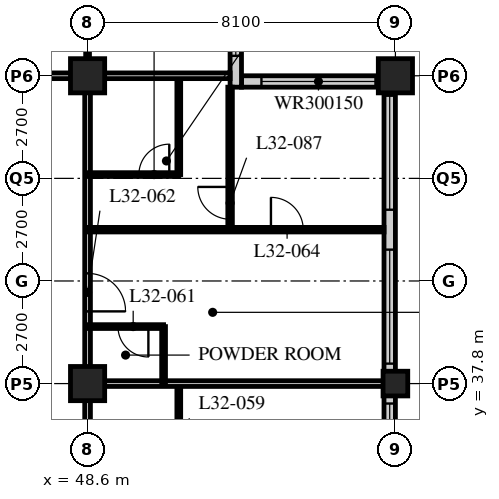
"""IFC4 building model, lengths in metres.
Left out: names, types, materials, properties, quantities, classifications, styles, units other than length and angle.
Written with IfcOpenShell. Run it as: python <this file> out.ifc"""

import sys

from ifc_helpers import new_model, si_unit, direction, frame, frame_2d, origin, origin_2d, place, context, subcontext, project, spatial, rectangle, hollow_rectangle, extrude, element, fill, save


model = new_model("IFC4")
c1 = context("Model", 3, precision=1e-05, world=origin(), true_north=direction((0.0, 1.0)))
c2 = subcontext(c1, "Body", "Model", "MODEL_VIEW")
j1 = project(units=[si_unit("LENGTHUNIT", "METRE"), si_unit("PLANEANGLEUNIT", "RADIAN")], contexts=[c1])
p1 = place(None, origin())
s1 = spatial("IfcSite", under=j1, at=p1, CompositionType="ELEMENT")
p2 = place(p1, origin())
s2 = spatial("IfcBuilding", under=s1, at=p2, CompositionType="ELEMENT")
p3 = place(p2, frame((0.0, 0.0, 127.2)))
s3 = spatial("IfcBuildingStorey", under=s2, at=p3, CompositionType="ELEMENT", Elevation=127.2)
for number, where, z_axis, x_axis in (
    (1, (48.6, 37.8, 0.0), (0.0, 0.0, 1.0), (1.0, 0.0, 0.0)),
    (2, (48.6, 45.9, 0.0), (0.0, 0.0, 1.0), (1.0, 0.0, 0.0)),
):
    element("IfcColumn", number, at=place(p3, frame(where, z_axis=z_axis, x_axis=x_axis)), inside=s3, PredefinedType="COLUMN", context=c2, shape_type="SweptSolid", body=[
        extrude(hollow_rectangle(XDim=0.9, YDim=0.9, WallThickness=0.09, at=origin_2d()), origin(), (0.0, 0.0, 1.0), 3.4),
    ])
p4 = place(p3, frame((56.7, 37.8, 0.0), z_axis=(0.0, 0.0, 1.0), x_axis=(1.0, 0.0, 0.0)))
e3 = element("IfcColumn", 3, at=p4, inside=s3, PredefinedType="COLUMN", context=c2, shape_type="SweptSolid", body=[
    extrude(hollow_rectangle(XDim=0.65, YDim=0.65, WallThickness=0.055, at=origin_2d()), origin(), (0.0, 0.0, 1.0), 3.4),
])
p5 = place(p3, frame((56.7, 45.9, 0.0), z_axis=(0.0, 0.0, 1.0), x_axis=(1.0, 0.0, 0.0)))
e4 = element("IfcColumn", 4, at=p5, inside=s3, PredefinedType="COLUMN", context=c2, shape_type="SweptSolid", body=[
    extrude(hollow_rectangle(XDim=0.9, YDim=0.9, WallThickness=0.09, at=origin_2d()), origin(), (0.0, 0.0, 1.0), 3.4),
])
p6 = place(p3, frame((56.55, 13.8, 0.0), z_axis=(0.0, 0.0, 1.0), x_axis=(0.0, 1.0, 0.0)))
e5 = element("IfcWall", 5, at=p6, inside=s3, PredefinedType="SOLIDWALL", context=c2, shape_type="SweptSolid", body=[
    extrude(rectangle(XDim=32.1, YDim=0.3, at=frame_2d((16.05, 0.0))), origin(), (0.0, 0.0, 1.0), 3.19),
])
p7 = place(p6, frame((0.225, 0.0, 0.9)))
e6 = element("IfcOpeningElement", 6, at=p7, cuts=e5, PredefinedType="OPENING", context=c2, shape_type="SweptSolid", body=[
    extrude(rectangle(XDim=3.0, YDim=2.0, at=frame_2d((1.5, 1.0))), frame((0.0, 0.16, 0.0), z_axis=(0.0, -1.0, 0.0), x_axis=(1.0, 0.0, 0.0)), (0.0, 0.0, 1.0), 0.32),
])
p8 = place(p6, frame((4.275, 0.0, 0.9)))
e7 = element("IfcOpeningElement", 7, at=p8, cuts=e5, PredefinedType="OPENING", context=c2, shape_type="SweptSolid", body=[
    extrude(rectangle(XDim=3.0, YDim=2.0, at=frame_2d((1.5, 1.0))), frame((0.0, 0.16, 0.0), z_axis=(0.0, -1.0, 0.0), x_axis=(1.0, 0.0, 0.0)), (0.0, 0.0, 1.0), 0.32),
])
p9 = place(p6, frame((8.325, 0.0, 0.9)))
e8 = element("IfcOpeningElement", 8, at=p9, cuts=e5, PredefinedType="OPENING", context=c2, shape_type="SweptSolid", body=[
    extrude(rectangle(XDim=3.0, YDim=2.0, at=frame_2d((1.5, 1.0))), frame((0.0, 0.16, 0.0), z_axis=(0.0, -1.0, 0.0), x_axis=(1.0, 0.0, 0.0)), (0.0, 0.0, 1.0), 0.32),
])
p10 = place(p6, frame((12.375, 0.0, 0.9)))
e9 = element("IfcOpeningElement", 9, at=p10, cuts=e5, PredefinedType="OPENING", context=c2, shape_type="SweptSolid", body=[
    extrude(rectangle(XDim=3.0, YDim=2.0, at=frame_2d((1.5, 1.0))), frame((0.0, 0.16, 0.0), z_axis=(0.0, -1.0, 0.0), x_axis=(1.0, 0.0, 0.0)), (0.0, 0.0, 1.0), 0.32),
])
p11 = place(p6, frame((16.425, 0.0, 0.9)))
e10 = element("IfcOpeningElement", 10, at=p11, cuts=e5, PredefinedType="OPENING", context=c2, shape_type="SweptSolid", body=[
    extrude(rectangle(XDim=3.0, YDim=2.0, at=frame_2d((1.5, 1.0))), frame((0.0, 0.16, 0.0), z_axis=(0.0, -1.0, 0.0), x_axis=(1.0, 0.0, 0.0)), (0.0, 0.0, 1.0), 0.32),
])
p12 = place(p6, frame((20.475, 0.0, 0.9)))
e11 = element("IfcOpeningElement", 11, at=p12, cuts=e5, PredefinedType="OPENING", context=c2, shape_type="SweptSolid", body=[
    extrude(rectangle(XDim=3.0, YDim=2.0, at=frame_2d((1.5, 1.0))), frame((0.0, 0.16, 0.0), z_axis=(0.0, -1.0, 0.0), x_axis=(1.0, 0.0, 0.0)), (0.0, 0.0, 1.0), 0.32),
])
p13 = place(p6, frame((24.525, 0.0, 0.9)))
e12 = element("IfcOpeningElement", 12, at=p13, cuts=e5, PredefinedType="OPENING", context=c2, shape_type="SweptSolid", body=[
    extrude(rectangle(XDim=3.0, YDim=2.0, at=frame_2d((1.5, 1.0))), frame((0.0, 0.16, 0.0), z_axis=(0.0, -1.0, 0.0), x_axis=(1.0, 0.0, 0.0)), (0.0, 0.0, 1.0), 0.32),
])
p14 = place(p6, frame((28.575, 0.0, 0.9)))
e13 = element("IfcOpeningElement", 13, at=p14, cuts=e5, PredefinedType="OPENING", context=c2, shape_type="SweptSolid", body=[
    extrude(rectangle(XDim=3.0, YDim=2.0, at=frame_2d((1.5, 1.0))), frame((0.0, 0.16, 0.0), z_axis=(0.0, -1.0, 0.0), x_axis=(1.0, 0.0, 0.0)), (0.0, 0.0, 1.0), 0.32),
])
p15 = place(p3, frame((56.4, 45.75, 0.0), z_axis=(0.0, 0.0, 1.0), x_axis=(-1.0, 0.0, 0.0)))
e14 = element("IfcWall", 14, at=p15, inside=s3, PredefinedType="SOLIDWALL", context=c2, shape_type="SweptSolid", body=[
    extrude(rectangle(XDim=3.75, YDim=0.3, at=frame_2d((1.875, 0.0))), origin(), (0.0, 0.0, 1.0), 3.19),
])
p16 = place(p15, frame((0.225, 0.0, 0.9)))
e15 = element("IfcOpeningElement", 15, at=p16, cuts=e14, PredefinedType="OPENING", context=c2, shape_type="SweptSolid", body=[
    extrude(rectangle(XDim=3.0, YDim=1.5, at=frame_2d((1.5, 0.75))), frame((0.0, 0.16, 0.0), z_axis=(0.0, -1.0, 0.0), x_axis=(1.0, 0.0, 0.0)), (0.0, 0.0, 1.0), 0.32),
])
p17 = place(p3, frame((52.5, 45.6, 0.0), z_axis=(0.0, 0.0, 1.0), x_axis=(0.0, 1.0, 0.0)))
e16 = element("IfcWall", 16, at=p17, inside=s3, PredefinedType="SOLIDWALL", context=c2, shape_type="SweptSolid", body=[
    extrude(rectangle(XDim=4.35, YDim=0.3, at=frame_2d((2.175, 0.0))), origin(), (0.0, 0.0, 1.0), 3.19),
])
p18 = place(p17, frame((0.825, 0.0, 0.9)))
e17 = element("IfcOpeningElement", 17, at=p18, cuts=e16, PredefinedType="OPENING", context=c2, shape_type="SweptSolid", body=[
    extrude(rectangle(XDim=3.0, YDim=1.5, at=frame_2d((1.5, 0.75))), frame((0.0, 0.16, 0.0), z_axis=(0.0, -1.0, 0.0), x_axis=(1.0, 0.0, 0.0)), (0.0, 0.0, 1.0), 0.32),
])
p19 = place(p3, frame((8.1, 45.9, 0.0), z_axis=(0.0, 0.0, 1.0), x_axis=(1.0, 0.0, 0.0)))
e18 = element("IfcWall", 18, at=p19, inside=s3, PredefinedType="PARTITIONING", context=c2, shape_type="SweptSolid", body=[
    extrude(rectangle(XDim=40.5, YDim=0.15, at=frame_2d((20.25, 0.0))), origin(), (0.0, 0.0, 1.0), 2.578),
])
p20 = place(p19, frame((9.625, 0.0, 0.0)))
e19 = element("IfcOpeningElement", 19, at=p20, cuts=e18, PredefinedType="OPENING", context=c2, shape_type="SweptSolid", body=[
    extrude(rectangle(XDim=1.0, YDim=2.1, at=frame_2d((0.5, 1.05))), frame((0.0, 0.085, 0.0), z_axis=(0.0, -1.0, 0.0), x_axis=(1.0, 0.0, 0.0)), (0.0, 0.0, 1.0), 0.17),
])
p21 = place(p19, frame((21.65, 0.0, 0.0)))
e20 = element("IfcOpeningElement", 20, at=p21, cuts=e18, PredefinedType="OPENING", context=c2, shape_type="SweptSolid", body=[
    extrude(rectangle(XDim=1.0, YDim=2.1, at=frame_2d((0.5, 1.05))), frame((0.0, 0.085, 0.0), z_axis=(0.0, -1.0, 0.0), x_axis=(1.0, 0.0, 0.0)), (0.0, 0.0, 1.0), 0.17),
])
p22 = place(p19, frame((26.75, 0.0, 0.0)))
e21 = element("IfcOpeningElement", 21, at=p22, cuts=e18, PredefinedType="OPENING", context=c2, shape_type="SweptSolid", body=[
    extrude(rectangle(XDim=1.0, YDim=2.1, at=frame_2d((0.5, 1.05))), frame((0.0, 0.085, 0.0), z_axis=(0.0, -1.0, 0.0), x_axis=(1.0, 0.0, 0.0)), (0.0, 0.0, 1.0), 0.17),
])
p23 = place(p19, frame((28.95, 0.0, 0.0)))
e22 = element("IfcOpeningElement", 22, at=p23, cuts=e18, PredefinedType="OPENING", context=c2, shape_type="SweptSolid", body=[
    extrude(rectangle(XDim=1.0, YDim=2.1, at=frame_2d((0.5, 1.05))), frame((0.0, 0.085, 0.0), z_axis=(0.0, -1.0, 0.0), x_axis=(1.0, 0.0, 0.0)), (0.0, 0.0, 1.0), 0.17),
])
p24 = place(p19, frame((34.85, 0.0, 0.0)))
e23 = element("IfcOpeningElement", 23, at=p24, cuts=e18, PredefinedType="OPENING", context=c2, shape_type="SweptSolid", body=[
    extrude(rectangle(XDim=1.0, YDim=2.1, at=frame_2d((0.5, 1.05))), frame((0.0, 0.085, 0.0), z_axis=(0.0, -1.0, 0.0), x_axis=(1.0, 0.0, 0.0)), (0.0, 0.0, 1.0), 0.17),
])
p25 = place(p19, frame((36.875, 0.0, 0.0)))
e24 = element("IfcOpeningElement", 24, at=p25, cuts=e18, PredefinedType="OPENING", context=c2, shape_type="SweptSolid", body=[
    extrude(rectangle(XDim=1.0, YDim=2.1, at=frame_2d((0.5, 1.05))), frame((0.0, 0.085, 0.0), z_axis=(0.0, -1.0, 0.0), x_axis=(1.0, 0.0, 0.0)), (0.0, 0.0, 1.0), 0.17),
])
p26 = place(p19, frame((2.625, 0.0, 0.0)))
e25 = element("IfcOpeningElement", 25, at=p26, cuts=e18, PredefinedType="OPENING", context=c2, shape_type="SweptSolid", body=[
    extrude(rectangle(XDim=1.0, YDim=2.1, at=frame_2d((0.5, 1.05))), frame((0.0, 0.085, 0.0), z_axis=(0.0, -1.0, 0.0), x_axis=(1.0, 0.0, 0.0)), (0.0, 0.0, 1.0), 0.17),
])
p27 = place(p3, frame((48.6, 21.6, 0.0), z_axis=(0.0, 0.0, 1.0), x_axis=(0.0, 1.0, 0.0)))
e26 = element("IfcWall", 26, at=p27, inside=s3, PredefinedType="PARTITIONING", context=c2, shape_type="SweptSolid", body=[
    extrude(rectangle(XDim=24.3, YDim=0.15, at=frame_2d((12.15, 0.0))), origin(), (0.0, 0.0, 1.0), 2.578),
])
p28 = place(p27, frame((2.75, 0.0, 0.0)))
e27 = element("IfcOpeningElement", 27, at=p28, cuts=e26, PredefinedType="OPENING", context=c2, shape_type="SweptSolid", body=[
    extrude(rectangle(XDim=1.0, YDim=2.1, at=frame_2d((0.5, 1.05))), frame((0.0, 0.085, 0.0), z_axis=(0.0, -1.0, 0.0), x_axis=(1.0, 0.0, 0.0)), (0.0, 0.0, 1.0), 0.17),
])
p29 = place(p27, frame((4.65, 0.0, 0.0)))
e28 = element("IfcOpeningElement", 28, at=p29, cuts=e26, PredefinedType="OPENING", context=c2, shape_type="SweptSolid", body=[
    extrude(rectangle(XDim=1.0, YDim=2.1, at=frame_2d((0.5, 1.05))), frame((0.0, 0.085, 0.0), z_axis=(0.0, -1.0, 0.0), x_axis=(1.0, 0.0, 0.0)), (0.0, 0.0, 1.0), 0.17),
])
p30 = place(p27, frame((10.0, 0.0, 0.0)))
e29 = element("IfcOpeningElement", 29, at=p30, cuts=e26, PredefinedType="OPENING", context=c2, shape_type="SweptSolid", body=[
    extrude(rectangle(XDim=1.0, YDim=2.1, at=frame_2d((0.5, 1.05))), frame((0.0, 0.085, 0.0), z_axis=(0.0, -1.0, 0.0), x_axis=(1.0, 0.0, 0.0)), (0.0, 0.0, 1.0), 0.17),
])
p31 = place(p27, frame((18.1, 0.0, 0.0)))
e30 = element("IfcOpeningElement", 30, at=p31, cuts=e26, PredefinedType="OPENING", context=c2, shape_type="SweptSolid", body=[
    extrude(rectangle(XDim=1.0, YDim=2.1, at=frame_2d((0.5, 1.05))), frame((0.0, 0.085, 0.0), z_axis=(0.0, -1.0, 0.0), x_axis=(1.0, 0.0, 0.0)), (0.0, 0.0, 1.0), 0.17),
])
p32 = place(p3, frame((51.0, 35.2, 0.0), z_axis=(0.0, 0.0, 1.0), x_axis=(0.0, 1.0, 0.0)))
e31 = element("IfcWall", 31, at=p32, inside=s3, PredefinedType="PARTITIONING", context=c2, shape_type="SweptSolid", body=[
    extrude(rectangle(XDim=2.6, YDim=0.1, at=frame_2d((1.3, 0.0))), origin(), (0.0, 0.0, 1.0), 3.19),
])
p33 = place(p3, frame((48.6, 37.8, 0.0), z_axis=(0.0, 0.0, 1.0), x_axis=(1.0, 0.0, 0.0)))
e32 = element("IfcWall", 32, at=p33, inside=s3, PredefinedType="PARTITIONING", context=c2, shape_type="SweptSolid", body=[
    extrude(rectangle(XDim=7.8, YDim=0.15, at=frame_2d((3.9, 0.0))), origin(), (0.0, 0.0, 1.0), 2.578),
])
p34 = place(p3, frame((50.6, 37.8, 0.0), z_axis=(0.0, 0.0, 1.0), x_axis=(0.0, 1.0, 0.0)))
e33 = element("IfcWall", 33, at=p34, inside=s3, PredefinedType="PARTITIONING", context=c2, shape_type="SweptSolid", body=[
    extrude(rectangle(XDim=1.5, YDim=0.1, at=frame_2d((0.75, 0.0))), origin(), (0.0, 0.0, 1.0), 3.19),
])
p35 = place(p3, frame((48.6, 39.3, 0.0), z_axis=(0.0, 0.0, 1.0), x_axis=(1.0, 0.0, 0.0)))
e34 = element("IfcWall", 34, at=p35, inside=s3, PredefinedType="PARTITIONING", context=c2, shape_type="SweptSolid", body=[
    extrude(rectangle(XDim=2.0, YDim=0.1, at=frame_2d((1.0, 0.0))), origin(), (0.0, 0.0, 1.0), 3.19),
])
p36 = place(p35, frame((0.8, 0.0, 0.0)))
e35 = element("IfcOpeningElement", 35, at=p36, cuts=e34, PredefinedType="OPENING", context=c2, shape_type="SweptSolid", body=[
    extrude(rectangle(XDim=0.8, YDim=2.1, at=frame_2d((0.4, 1.05))), frame((0.0, 0.06, 0.0), z_axis=(0.0, -1.0, 0.0), x_axis=(1.0, 0.0, 0.0)), (0.0, 0.0, 1.0), 0.12),
])
p37 = place(p3, frame((51.0, 43.3, 0.0), z_axis=(0.0, 0.0, 1.0), x_axis=(0.0, 1.0, 0.0)))
e36 = element("IfcWall", 36, at=p37, inside=s3, PredefinedType="PARTITIONING", context=c2, shape_type="SweptSolid", body=[
    extrude(rectangle(XDim=2.6, YDim=0.1, at=frame_2d((1.3, 0.0))), origin(), (0.0, 0.0, 1.0), 3.19),
])
p38 = place(p3, frame((48.6, 43.3, 0.0), z_axis=(0.0, 0.0, 1.0), x_axis=(1.0, 0.0, 0.0)))
e37 = element("IfcWall", 37, at=p38, inside=s3, PredefinedType="PARTITIONING", context=c2, shape_type="SweptSolid", body=[
    extrude(rectangle(XDim=2.4, YDim=0.1, at=frame_2d((1.2, 0.0))), origin(), (0.0, 0.0, 1.0), 3.19),
])
p39 = place(p38, frame((1.35, 0.0, 0.0)))
e38 = element("IfcOpeningElement", 38, at=p39, cuts=e37, PredefinedType="OPENING", context=c2, shape_type="SweptSolid", body=[
    extrude(rectangle(XDim=0.8, YDim=2.1, at=frame_2d((0.4, 1.05))), frame((0.0, 0.06, 0.0), z_axis=(0.0, -1.0, 0.0), x_axis=(1.0, 0.0, 0.0)), (0.0, 0.0, 1.0), 0.12),
])
p40 = place(p3, frame((48.6, 41.85, 0.0), z_axis=(0.0, 0.0, 1.0), x_axis=(1.0, 0.0, 0.0)))
e39 = element("IfcWall", 39, at=p40, inside=s3, PredefinedType="PARTITIONING", context=c2, shape_type="SweptSolid", body=[
    extrude(rectangle(XDim=7.8, YDim=0.12, at=frame_2d((3.9, 0.0))), origin(), (0.0, 0.0, 1.0), 3.19),
])
p41 = place(p40, frame((4.825, 0.0, 0.0)))
e40 = element("IfcOpeningElement", 40, at=p41, cuts=e39, PredefinedType="OPENING", context=c2, shape_type="SweptSolid", body=[
    extrude(rectangle(XDim=0.85, YDim=2.1, at=frame_2d((0.425, 1.05))), frame((0.0, 0.07, 0.0), z_axis=(0.0, -1.0, 0.0), x_axis=(1.0, 0.0, 0.0)), (0.0, 0.0, 1.0), 0.14),
])
p42 = place(p3, frame((48.6, 45.9, 0.0), z_axis=(0.0, 0.0, 1.0), x_axis=(0.0, 1.0, 0.0)))
e41 = element("IfcWall", 41, at=p42, inside=s3, PredefinedType="PARTITIONING", context=c2, shape_type="SweptSolid", body=[
    extrude(rectangle(XDim=2.4, YDim=0.1, at=frame_2d((1.2, 0.0))), origin(), (0.0, 0.0, 1.0), 2.578),
])
p43 = place(p3, frame((48.6, 45.9, 0.0), z_axis=(0.0, 0.0, 1.0), x_axis=(1.0, 0.0, 0.0)))
e42 = element("IfcWall", 42, at=p43, inside=s3, PredefinedType="PARTITIONING", context=c2, shape_type="SweptSolid", body=[
    extrude(rectangle(XDim=3.75, YDim=0.15, at=frame_2d((1.875, 0.0))), origin(), (0.0, 0.0, 1.0), 2.578),
])
p44 = place(p3, frame((52.35, 45.6, 0.0), z_axis=(0.0, 0.0, 1.0), x_axis=(0.0, -1.0, 0.0)))
e43 = element("IfcWall", 43, at=p44, inside=s3, PredefinedType="PARTITIONING", context=c2, shape_type="SweptSolid", body=[
    extrude(rectangle(XDim=3.75, YDim=0.12, at=frame_2d((1.875, 0.0))), origin(), (0.0, 0.0, 1.0), 3.19),
])
p45 = place(p44, frame((2.625, 0.0, 0.0)))
e44 = element("IfcOpeningElement", 44, at=p45, cuts=e43, PredefinedType="OPENING", context=c2, shape_type="SweptSolid", body=[
    extrude(rectangle(XDim=0.85, YDim=2.1, at=frame_2d((0.425, 1.05))), frame((0.0, 0.07, 0.0), z_axis=(0.0, -1.0, 0.0), x_axis=(1.0, 0.0, 0.0)), (0.0, 0.0, 1.0), 0.14),
])
p46 = place(p12, origin())
e45 = element("IfcWindow", 45, at=p46, inside=s3, PartitioningType="SINGLE_PANEL", PredefinedType="WINDOW", context=c2, shape_type="SweptSolid", body=[
    extrude(rectangle(XDim=3.0, YDim=2.0, at=frame_2d((1.5, 1.0))), frame((0.0, 0.03, 0.0), z_axis=(0.0, -1.0, 0.0), x_axis=(1.0, 0.0, 0.0)), (0.0, 0.0, 1.0), 0.06),
])
fill(e11, e45)
p47 = place(p13, origin())
e46 = element("IfcWindow", 46, at=p47, inside=s3, PartitioningType="SINGLE_PANEL", PredefinedType="WINDOW", context=c2, shape_type="SweptSolid", body=[
    extrude(rectangle(XDim=3.0, YDim=2.0, at=frame_2d((1.5, 1.0))), frame((0.0, 0.03, 0.0), z_axis=(0.0, -1.0, 0.0), x_axis=(1.0, 0.0, 0.0)), (0.0, 0.0, 1.0), 0.06),
])
fill(e12, e46)
p48 = place(p14, origin())
e47 = element("IfcWindow", 47, at=p48, inside=s3, PartitioningType="SINGLE_PANEL", PredefinedType="WINDOW", context=c2, shape_type="SweptSolid", body=[
    extrude(rectangle(XDim=3.0, YDim=2.0, at=frame_2d((1.5, 1.0))), frame((0.0, 0.03, 0.0), z_axis=(0.0, -1.0, 0.0), x_axis=(1.0, 0.0, 0.0)), (0.0, 0.0, 1.0), 0.06),
])
fill(e13, e47)
p49 = place(p16, origin())
e48 = element("IfcWindow", 48, at=p49, inside=s3, PartitioningType="SINGLE_PANEL", PredefinedType="WINDOW", context=c2, shape_type="SweptSolid", body=[
    extrude(rectangle(XDim=3.0, YDim=1.5, at=frame_2d((1.5, 0.75))), frame((0.0, 0.03, 0.0), z_axis=(0.0, -1.0, 0.0), x_axis=(1.0, 0.0, 0.0)), (0.0, 0.0, 1.0), 0.06),
])
fill(e15, e48)
p50 = place(p18, origin())
e49 = element("IfcWindow", 49, at=p50, inside=s3, PartitioningType="SINGLE_PANEL", PredefinedType="WINDOW", context=c2, shape_type="SweptSolid", body=[
    extrude(rectangle(XDim=3.0, YDim=1.5, at=frame_2d((1.5, 0.75))), frame((0.0, 0.03, 0.0), z_axis=(0.0, -1.0, 0.0), x_axis=(1.0, 0.0, 0.0)), (0.0, 0.0, 1.0), 0.06),
])
fill(e17, e49)
p51 = place(p36, origin())
e50 = element("IfcDoor", 50, at=p51, inside=s3, OperationType="SINGLE_SWING_LEFT", PredefinedType="DOOR", context=c2, shape_type="SweptSolid", body=[
    extrude(rectangle(XDim=0.8, YDim=2.1, at=frame_2d((0.4, 1.05))), frame((0.0, 0.025, 0.0), z_axis=(0.0, -1.0, 0.0), x_axis=(1.0, 0.0, 0.0)), (0.0, 0.0, 1.0), 0.05),
])
fill(e35, e50)
p52 = place(p31, origin())
e51 = element("IfcDoor", 51, at=p52, inside=s3, OperationType="SINGLE_SWING_RIGHT", PredefinedType="DOOR", context=c2, shape_type="SweptSolid", body=[
    extrude(rectangle(XDim=1.0, YDim=2.1, at=frame_2d((0.5, 1.05))), frame((0.0, 0.025, 0.0), z_axis=(0.0, -1.0, 0.0), x_axis=(1.0, 0.0, 0.0)), (0.0, 0.0, 1.0), 0.05),
])
fill(e30, e51)
p53 = place(p39, origin())
e52 = element("IfcDoor", 52, at=p53, inside=s3, OperationType="SINGLE_SWING_RIGHT", PredefinedType="DOOR", context=c2, shape_type="SweptSolid", body=[
    extrude(rectangle(XDim=0.8, YDim=2.1, at=frame_2d((0.4, 1.05))), frame((0.0, 0.025, 0.0), z_axis=(0.0, -1.0, 0.0), x_axis=(1.0, 0.0, 0.0)), (0.0, 0.0, 1.0), 0.05),
])
fill(e38, e52)
p54 = place(p41, origin())
e53 = element("IfcDoor", 53, at=p54, inside=s3, OperationType="SINGLE_SWING_LEFT", PredefinedType="DOOR", context=c2, shape_type="SweptSolid", body=[
    extrude(rectangle(XDim=0.85, YDim=2.1, at=frame_2d((0.425, 1.05))), frame((0.0, 0.025, 0.0), z_axis=(0.0, -1.0, 0.0), x_axis=(1.0, 0.0, 0.0)), (0.0, 0.0, 1.0), 0.05),
])
fill(e40, e53)
p55 = place(p45, origin())
e54 = element("IfcDoor", 54, at=p55, inside=s3, OperationType="SINGLE_SWING_RIGHT", PredefinedType="DOOR", context=c2, shape_type="SweptSolid", body=[
    extrude(rectangle(XDim=0.85, YDim=2.1, at=frame_2d((0.425, 1.05))), frame((0.0, 0.025, 0.0), z_axis=(0.0, -1.0, 0.0), x_axis=(1.0, 0.0, 0.0)), (0.0, 0.0, 1.0), 0.05),
])
fill(e44, e54)
save(model, sys.argv[1])
